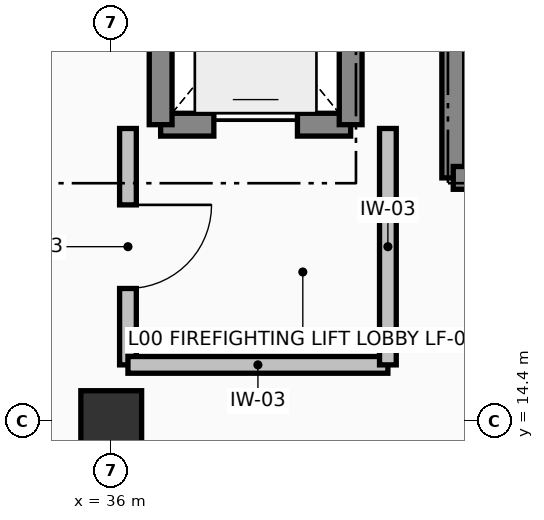
"""IFC4 building model, lengths in metres.
Left out: names, types, materials, properties, quantities, classifications, styles, units other than length and angle.
Written with IfcOpenShell. Run it as: python <this file> out.ifc"""

import sys

from ifc_helpers import new_model, si_unit, direction, frame, frame_2d, origin, origin_2d, place, context, subcontext, project, spatial, rectangle, extrude, element, fill, save


model = new_model("IFC4")
c1 = context("Model", 3, precision=1e-05, world=origin(), true_north=direction((0.0, 1.0)))
c2 = subcontext(c1, "Body", "Model", "MODEL_VIEW")
j1 = project(units=[si_unit("LENGTHUNIT", "METRE"), si_unit("PLANEANGLEUNIT", "RADIAN")], contexts=[c1])
p1 = place(None, origin())
s1 = spatial("IfcSite", under=j1, at=p1, CompositionType="ELEMENT")
p2 = place(p1, origin())
s2 = spatial("IfcBuilding", under=s1, at=p2, CompositionType="ELEMENT")
p3 = place(p2, origin())
s3 = spatial("IfcBuildingStorey", under=s2, at=p3, CompositionType="ELEMENT", Elevation=0.0)
p4 = place(p3, frame((36.0, 14.4, 0.0), z_axis=(0.0, 0.0, 1.0), x_axis=(1.0, 0.0, 0.0)))
e1 = element("IfcColumn", 1, at=p4, inside=s3, PredefinedType="COLUMN", context=c2, shape_type="SweptSolid", body=[
    extrude(rectangle(XDim=0.8, YDim=0.8, at=origin_2d()), origin(), (0.0, 0.0, 1.0), 5.76),
])
p5 = place(p3, frame((40.5, 17.6, 0.0), z_axis=(0.0, 0.0, 1.0), x_axis=(0.0, 1.0, 0.0)))
e2 = element("IfcWall", 2, at=p5, inside=s3, PredefinedType="SHEAR", context=c2, shape_type="SweptSolid", body=[
    extrude(rectangle(XDim=3.8, YDim=0.3, at=frame_2d((1.9, 0.0))), origin(), (0.0, 0.0, 1.0), 5.76),
])
p6 = place(p3, frame((40.5, 17.6, 0.0), z_axis=(0.0, 0.0, 1.0), x_axis=(1.0, 0.0, 0.0)))
e3 = element("IfcWall", 3, at=p6, inside=s3, PredefinedType="SHEAR", context=c2, shape_type="SweptSolid", body=[
    extrude(rectangle(XDim=9.0, YDim=0.3, at=frame_2d((4.5, 0.0))), origin(), (0.0, 0.0, 1.0), 5.76),
])
p7 = place(p6, frame((0.35, 0.0, 0.0)))
e4 = element("IfcOpeningElement", 4, at=p7, cuts=e3, PredefinedType="OPENING", context=c2, shape_type="SweptSolid", body=[
    extrude(rectangle(XDim=1.15, YDim=2.15, at=frame_2d((0.575, 1.075))), frame((0.0, 0.16, 0.0), z_axis=(0.0, -1.0, 0.0), x_axis=(1.0, 0.0, 0.0)), (0.0, 0.0, 1.0), 0.32),
])
p8 = place(p3, frame((36.65, 18.3, 0.0), z_axis=(0.0, 0.0, 1.0), x_axis=(1.0, 0.0, 0.0)))
e5 = element("IfcWall", 5, at=p8, inside=s3, PredefinedType="SHEAR", context=c2, shape_type="SweptSolid", body=[
    extrude(rectangle(XDim=2.5, YDim=0.3, at=frame_2d((1.25, 0.0))), origin(), (0.0, 0.0, 1.0), 5.76),
])
p9 = place(p8, frame((0.7, 0.0, 0.0)))
e6 = element("IfcOpeningElement", 6, at=p9, cuts=e5, PredefinedType="OPENING", context=c2, shape_type="SweptSolid", body=[
    extrude(rectangle(XDim=1.1, YDim=2.1, at=frame_2d((0.55, 1.05))), frame((0.0, 0.16, 0.0), z_axis=(0.0, -1.0, 0.0), x_axis=(1.0, 0.0, 0.0)), (0.0, 0.0, 1.0), 0.32),
])
for number, where, z_axis, x_axis in (
    (7, (36.65, 18.3, 0.0), (0.0, 0.0, 1.0), (0.0, 1.0, 0.0)),
    (8, (39.15, 18.3, 0.0), (0.0, 0.0, 1.0), (0.0, 1.0, 0.0)),
):
    element("IfcWall", number, at=place(p3, frame(where, z_axis=z_axis, x_axis=x_axis)), inside=s3, PredefinedType="SHEAR", context=c2, shape_type="SweptSolid", body=[
        extrude(rectangle(XDim=3.0, YDim=0.3, at=frame_2d((1.5, 0.0))), origin(), (0.0, 0.0, 1.0), 5.76),
    ])
p10 = place(p3, frame((36.22, 18.25, 0.0), z_axis=(0.0, 0.0, 1.0), x_axis=(0.0, -1.0, 0.0)))
e9 = element("IfcWall", 9, at=p10, inside=s3, PredefinedType="SOLIDWALL", context=c2, shape_type="SweptSolid", body=[
    extrude(rectangle(XDim=3.11, YDim=0.22, at=frame_2d((1.555, 0.0))), origin(), (0.0, 0.0, 1.0), 4.64),
])
p11 = place(p10, frame((1.005, 0.0, 0.0)))
e10 = element("IfcOpeningElement", 10, at=p11, cuts=e9, PredefinedType="OPENING", context=c2, shape_type="SweptSolid", body=[
    extrude(rectangle(XDim=1.1, YDim=2.15, at=frame_2d((0.55, 1.075))), frame((0.0, 0.12, 0.0), z_axis=(0.0, -1.0, 0.0), x_axis=(1.0, 0.0, 0.0)), (0.0, 0.0, 1.0), 0.24),
])
p12 = place(p3, frame((36.22, 15.14, 0.0), z_axis=(0.0, 0.0, 1.0), x_axis=(1.0, 0.0, 0.0)))
e11 = element("IfcWall", 11, at=p12, inside=s3, PredefinedType="SOLIDWALL", context=c2, shape_type="SweptSolid", body=[
    extrude(rectangle(XDim=3.42, YDim=0.22, at=frame_2d((1.71, 0.0))), origin(), (0.0, 0.0, 1.0), 5.5),
])
p13 = place(p3, frame((39.64, 15.14, 0.0), z_axis=(0.0, 0.0, 1.0), x_axis=(0.0, 1.0, 0.0)))
e12 = element("IfcWall", 12, at=p13, inside=s3, PredefinedType="SOLIDWALL", context=c2, shape_type="SweptSolid", body=[
    extrude(rectangle(XDim=3.11, YDim=0.22, at=frame_2d((1.555, 0.0))), origin(), (0.0, 0.0, 1.0), 5.5),
])
p14 = place(p9, origin())
e13 = element("IfcDoor", 13, at=p14, inside=s3, OperationType="SLIDING_TO_LEFT", PredefinedType="DOOR", context=c2, shape_type="SweptSolid", body=[
    extrude(rectangle(XDim=1.1, YDim=2.1, at=frame_2d((0.55, 1.05))), frame((0.0, 0.025, 0.0), z_axis=(0.0, -1.0, 0.0), x_axis=(1.0, 0.0, 0.0)), (0.0, 0.0, 1.0), 0.05),
])
fill(e6, e13)
p15 = place(p11, origin())
e14 = element("IfcDoor", 14, at=p15, inside=s3, OperationType="SINGLE_SWING_LEFT", PredefinedType="DOOR", context=c2, shape_type="SweptSolid", body=[
    extrude(rectangle(XDim=1.1, YDim=2.15, at=frame_2d((0.55, 1.075))), frame((0.0, 0.025, 0.0), z_axis=(0.0, -1.0, 0.0), x_axis=(1.0, 0.0, 0.0)), (0.0, 0.0, 1.0), 0.05),
])
fill(e10, e14)
save(model, sys.argv[1])
